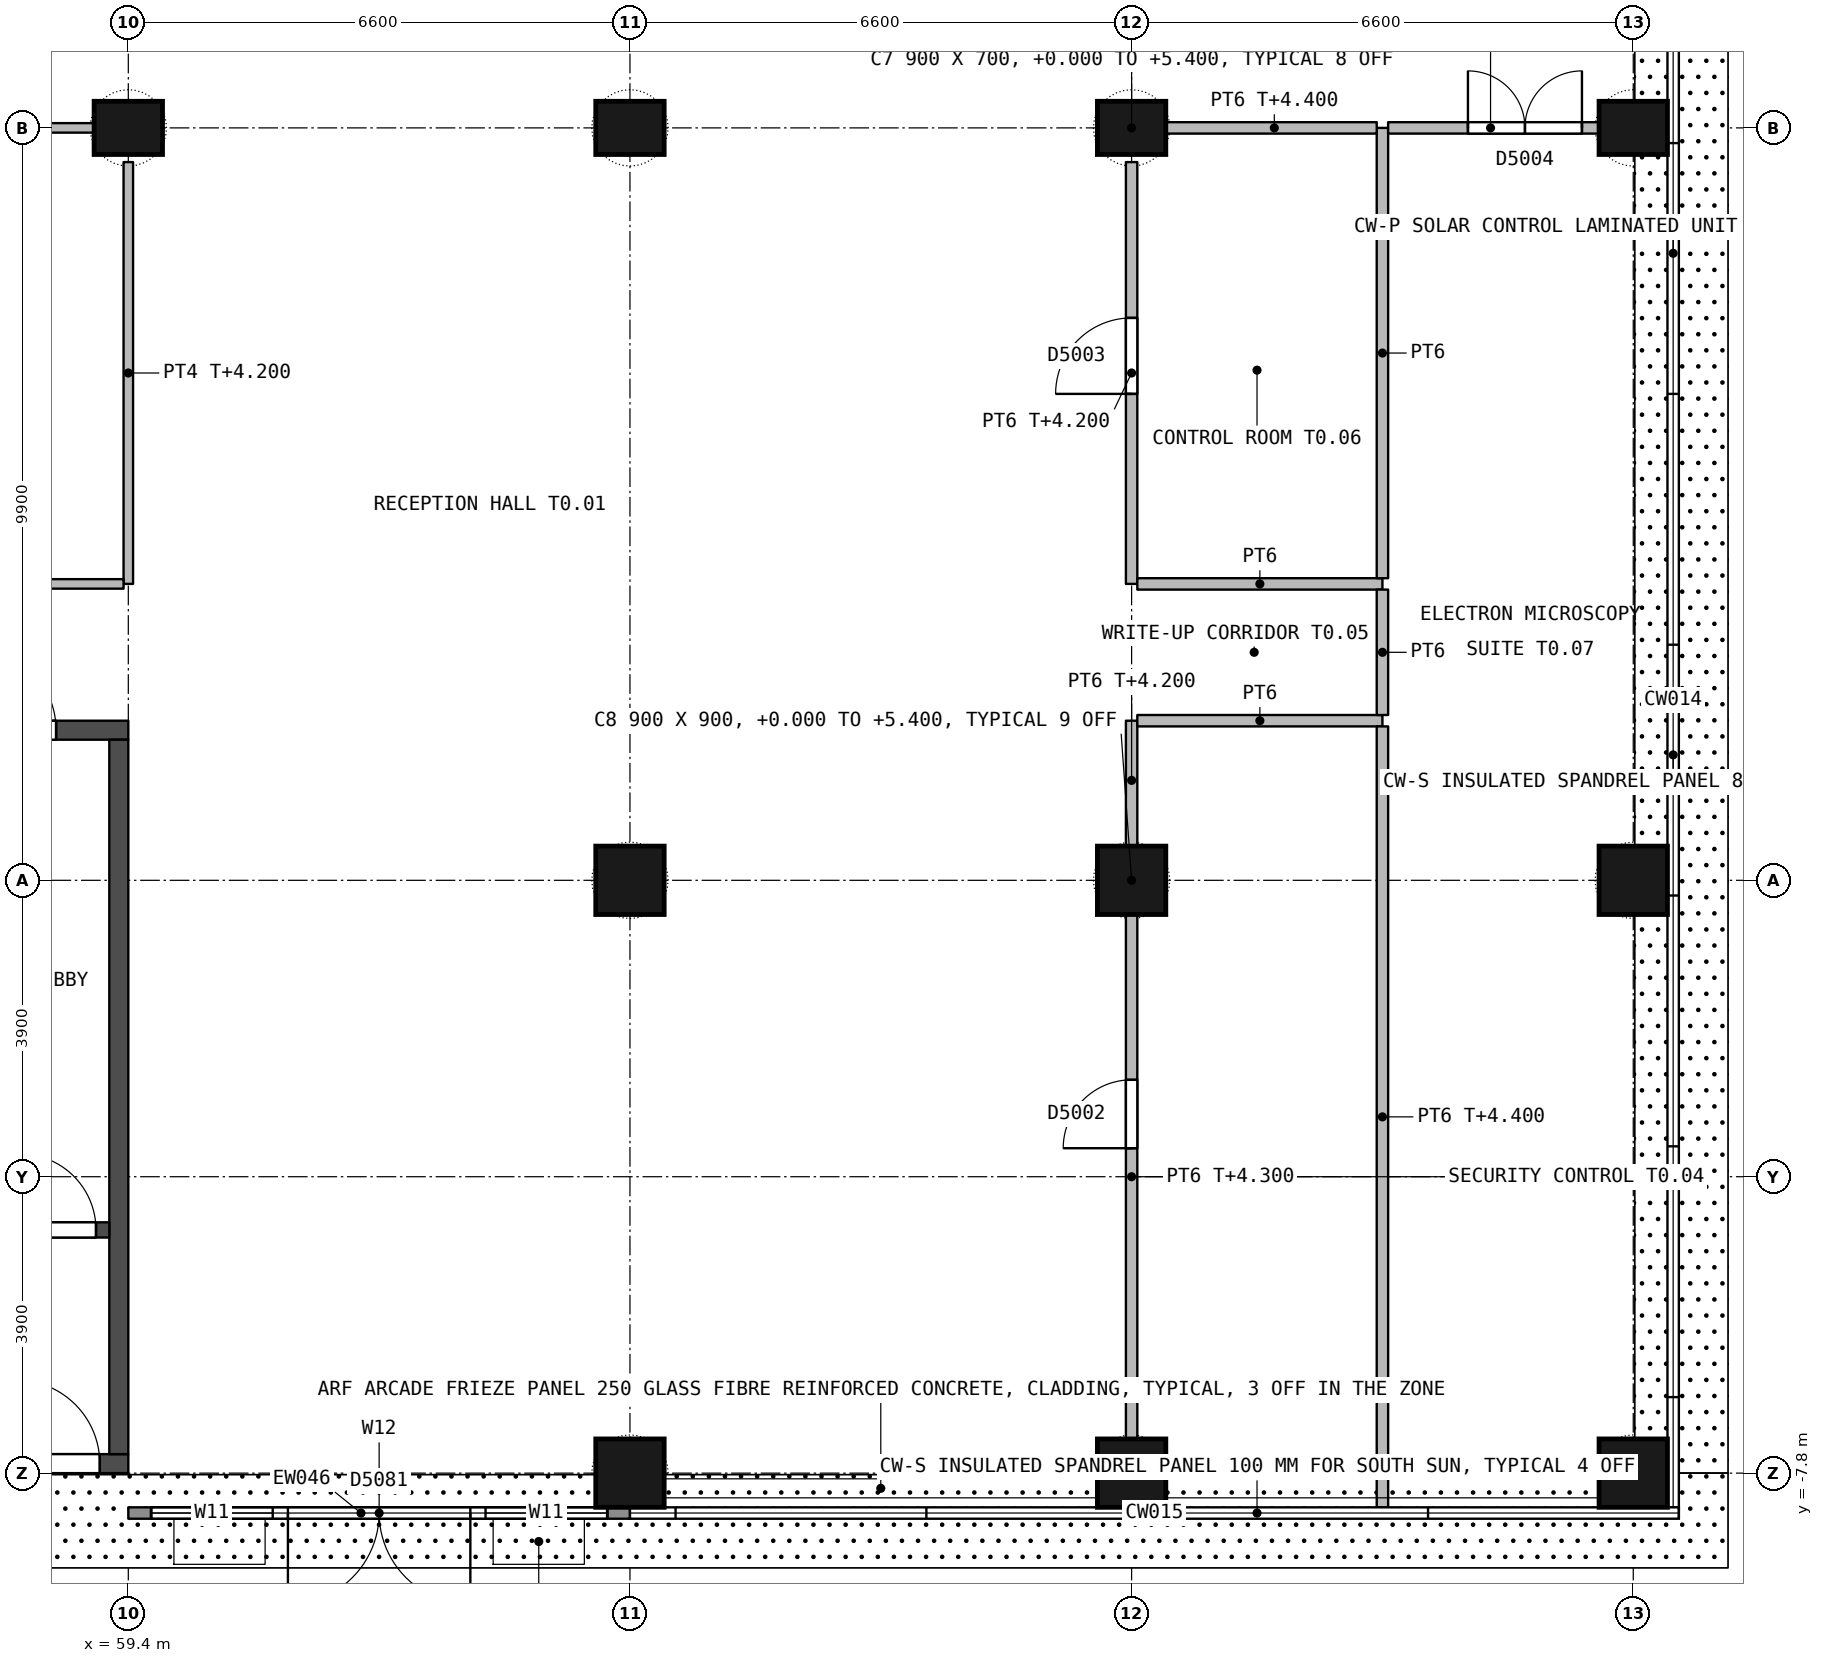
"""IFC4 building model, lengths in metres.
Left out: names, types, materials, properties, quantities, classifications, styles, units other than length and angle.
Written with IfcOpenShell. Run it as: python <this file> out.ifc"""

import sys

from ifc_helpers import new_model, si_unit, direction, frame, frame_2d, origin, origin_2d, place, context, subcontext, project, spatial, rectangle, extrude, element, fill, save


model = new_model("IFC4")
c1 = context("Model", 3, precision=1e-05, world=origin(), true_north=direction((0.0, 1.0)))
c2 = subcontext(c1, "Body", "Model", "MODEL_VIEW")
j1 = project(units=[si_unit("LENGTHUNIT", "METRE"), si_unit("PLANEANGLEUNIT", "RADIAN")], contexts=[c1])
p1 = place(None, origin())
s1 = spatial("IfcSite", under=j1, at=p1, CompositionType="ELEMENT")
p2 = place(p1, origin())
s2 = spatial("IfcBuilding", under=s1, at=p2, CompositionType="ELEMENT")
p3 = place(p2, origin())
s3 = spatial("IfcBuildingStorey", under=s2, at=p3, CompositionType="ELEMENT", Elevation=0.0)
p4 = place(p3, frame((59.4, 9.9, 0.0), z_axis=(0.0, 0.0, 1.0), x_axis=(1.0, 0.0, 0.0)))
e1 = element("IfcColumn", 1, at=p4, inside=s3, PredefinedType="COLUMN", context=c2, shape_type="SweptSolid", body=[
    extrude(rectangle(XDim=0.9, YDim=0.7, at=origin_2d()), origin(), (0.0, 0.0, 1.0), 5.4),
])
for number, where, z_axis, x_axis in (
    (2, (66.0, -7.8, 0.0), (0.0, 0.0, 1.0), (1.0, 0.0, 0.0)),
    (3, (66.0, 0.0, 0.0), (0.0, 0.0, 1.0), (1.0, 0.0, 0.0)),
):
    element("IfcColumn", number, at=place(p3, frame(where, z_axis=z_axis, x_axis=x_axis)), inside=s3, PredefinedType="COLUMN", context=c2, shape_type="SweptSolid", body=[
        extrude(rectangle(XDim=0.9, YDim=0.9, at=origin_2d()), origin(), (0.0, 0.0, 1.0), 5.4),
    ])
p5 = place(p3, frame((66.0, 9.9, 0.0), z_axis=(0.0, 0.0, 1.0), x_axis=(1.0, 0.0, 0.0)))
e4 = element("IfcColumn", 4, at=p5, inside=s3, PredefinedType="COLUMN", context=c2, shape_type="SweptSolid", body=[
    extrude(rectangle(XDim=0.9, YDim=0.7, at=origin_2d()), origin(), (0.0, 0.0, 1.0), 5.4),
])
for number, where, z_axis, x_axis in (
    (5, (72.6, -7.8, 0.0), (0.0, 0.0, 1.0), (1.0, 0.0, 0.0)),
    (6, (72.6, 0.0, 0.0), (0.0, 0.0, 1.0), (1.0, 0.0, 0.0)),
):
    element("IfcColumn", number, at=place(p3, frame(where, z_axis=z_axis, x_axis=x_axis)), inside=s3, PredefinedType="COLUMN", context=c2, shape_type="SweptSolid", body=[
        extrude(rectangle(XDim=0.9, YDim=0.9, at=origin_2d()), origin(), (0.0, 0.0, 1.0), 5.4),
    ])
p6 = place(p3, frame((72.6, 9.9, 0.0), z_axis=(0.0, 0.0, 1.0), x_axis=(1.0, 0.0, 0.0)))
e7 = element("IfcColumn", 7, at=p6, inside=s3, PredefinedType="COLUMN", context=c2, shape_type="SweptSolid", body=[
    extrude(rectangle(XDim=0.9, YDim=0.7, at=origin_2d()), origin(), (0.0, 0.0, 1.0), 5.4),
])
for number, where, z_axis, x_axis in (
    (8, (79.2, -7.8, 0.0), (0.0, 0.0, 1.0), (1.0, 0.0, 0.0)),
    (9, (79.2, 0.0, 0.0), (0.0, 0.0, 1.0), (1.0, 0.0, 0.0)),
):
    element("IfcColumn", number, at=place(p3, frame(where, z_axis=z_axis, x_axis=x_axis)), inside=s3, PredefinedType="COLUMN", context=c2, shape_type="SweptSolid", body=[
        extrude(rectangle(XDim=0.9, YDim=0.9, at=origin_2d()), origin(), (0.0, 0.0, 1.0), 5.4),
    ])
p7 = place(p3, frame((79.2, 9.9, 0.0), z_axis=(0.0, 0.0, 1.0), x_axis=(1.0, 0.0, 0.0)))
e10 = element("IfcColumn", 10, at=p7, inside=s3, PredefinedType="COLUMN", context=c2, shape_type="SweptSolid", body=[
    extrude(rectangle(XDim=0.9, YDim=0.7, at=origin_2d()), origin(), (0.0, 0.0, 1.0), 5.4),
])
p8 = place(p3, frame((59.4, 1.975, 0.0), z_axis=(0.0, 0.0, 1.0), x_axis=(-1.0, 0.0, 0.0)))
e11 = element("IfcWall", 11, at=p8, inside=s3, PredefinedType="SHEAR", context=c2, shape_type="SweptSolid", body=[
    extrude(rectangle(XDim=6.6, YDim=0.25, at=frame_2d((3.3, 0.0))), origin(), (0.0, 0.0, 1.0), 5.1),
])
p9 = place(p8, frame((0.95, 0.0, 0.0)))
e12 = element("IfcOpeningElement", 12, at=p9, cuts=e11, PredefinedType="OPENING", context=c2, shape_type="SweptSolid", body=[
    extrude(rectangle(XDim=1.1, YDim=2.1, at=frame_2d((0.55, 1.05))), frame((0.0, 0.135, 0.0), z_axis=(0.0, -1.0, 0.0), x_axis=(1.0, 0.0, 0.0)), (0.0, 0.0, 1.0), 0.27),
])
p10 = place(p3, frame((59.4, -7.675, 0.0), z_axis=(0.0, 0.0, 1.0), x_axis=(-1.0, 0.0, 0.0)))
e13 = element("IfcWall", 13, at=p10, inside=s3, PredefinedType="SHEAR", context=c2, shape_type="SweptSolid", body=[
    extrude(rectangle(XDim=6.6, YDim=0.25, at=frame_2d((3.3, 0.0))), origin(), (0.0, 0.0, 1.0), 5.1),
])
p11 = place(p10, frame((0.375, 0.0, 0.0)))
e14 = element("IfcOpeningElement", 14, at=p11, cuts=e13, PredefinedType="OPENING", context=c2, shape_type="SweptSolid", body=[
    extrude(rectangle(XDim=1.1, YDim=2.4, at=frame_2d((0.55, 1.2))), frame((0.0, 0.135, 0.0), z_axis=(0.0, -1.0, 0.0), x_axis=(1.0, 0.0, 0.0)), (0.0, 0.0, 1.0), 0.27),
])
p12 = place(p10, frame((4.735, 0.0, 2.05)))
e15 = element("IfcOpeningElement", 15, at=p12, cuts=e13, PredefinedType="OPENING", context=c2, shape_type="SweptSolid", body=[
    extrude(rectangle(XDim=0.9, YDim=1.2, at=frame_2d((0.45, 0.6))), frame((0.0, 0.135, 0.0), z_axis=(0.0, -1.0, 0.0), x_axis=(1.0, 0.0, 0.0)), (0.0, 0.0, 1.0), 0.27),
])
p13 = place(p3, frame((59.275, 1.85, 0.0), z_axis=(0.0, 0.0, 1.0), x_axis=(0.0, -1.0, 0.0)))
e16 = element("IfcWall", 16, at=p13, inside=s3, PredefinedType="SHEAR", context=c2, shape_type="SweptSolid", body=[
    extrude(rectangle(XDim=9.4, YDim=0.25, at=frame_2d((4.7, 0.0))), origin(), (0.0, 0.0, 1.0), 5.1),
])
p14 = place(p3, frame((59.15, -4.6, 0.0), z_axis=(0.0, 0.0, 1.0), x_axis=(-1.0, 0.0, 0.0)))
e17 = element("IfcWall", 17, at=p14, inside=s3, PredefinedType="SHEAR", context=c2, shape_type="SweptSolid", body=[
    extrude(rectangle(XDim=6.1, YDim=0.2, at=frame_2d((3.05, 0.0))), origin(), (0.0, 0.0, 1.0), 5.1),
])
p15 = place(p14, frame((0.175, 0.0, 0.0)))
e18 = element("IfcOpeningElement", 18, at=p15, cuts=e17, PredefinedType="OPENING", context=c2, shape_type="SweptSolid", body=[
    extrude(rectangle(XDim=1.0, YDim=2.1, at=frame_2d((0.5, 1.05))), frame((0.0, 0.11, 0.0), z_axis=(0.0, -1.0, 0.0), x_axis=(1.0, 0.0, 0.0)), (0.0, 0.0, 1.0), 0.22),
])
p16 = place(p3, frame((66.0, -8.325, 0.0), z_axis=(0.0, 0.0, 1.0), x_axis=(-1.0, 0.0, 0.0)))
e19 = element("IfcWall", 19, at=p16, inside=s3, PredefinedType="STANDARD", context=c2, shape_type="SweptSolid", body=[
    extrude(rectangle(XDim=6.6, YDim=0.15, at=frame_2d((3.3, 0.0))), origin(), (0.0, 0.0, 1.0), 5.1),
])
p17 = place(p16, frame((2.1, 0.0, 0.0)))
e20 = element("IfcOpeningElement", 20, at=p17, cuts=e19, PredefinedType="OPENING", context=c2, shape_type="SweptSolid", body=[
    extrude(rectangle(XDim=2.4, YDim=2.7, at=frame_2d((1.2, 1.35))), frame((0.0, 0.085, 0.0), z_axis=(0.0, -1.0, 0.0), x_axis=(1.0, 0.0, 0.0)), (0.0, 0.0, 1.0), 0.17),
])
p18 = place(p16, frame((4.7, 0.0, 0.1)))
e21 = element("IfcOpeningElement", 21, at=p18, cuts=e19, PredefinedType="OPENING", context=c2, shape_type="SweptSolid", body=[
    extrude(rectangle(XDim=1.6, YDim=2.6, at=frame_2d((0.8, 1.3))), frame((0.0, 0.085, 0.0), z_axis=(0.0, -1.0, 0.0), x_axis=(1.0, 0.0, 0.0)), (0.0, 0.0, 1.0), 0.17),
])
p19 = place(p16, frame((0.3, 0.0, 0.1)))
e22 = element("IfcOpeningElement", 22, at=p19, cuts=e19, PredefinedType="OPENING", context=c2, shape_type="SweptSolid", body=[
    extrude(rectangle(XDim=1.6, YDim=2.6, at=frame_2d((0.8, 1.3))), frame((0.0, 0.085, 0.0), z_axis=(0.0, -1.0, 0.0), x_axis=(1.0, 0.0, 0.0)), (0.0, 0.0, 1.0), 0.17),
])
p20 = place(p16, frame((0.3, 0.0, 2.85)))
e23 = element("IfcOpeningElement", 23, at=p20, cuts=e19, PredefinedType="OPENING", context=c2, shape_type="SweptSolid", body=[
    extrude(rectangle(XDim=6.0, YDim=2.1, at=frame_2d((3.0, 1.05))), frame((0.0, 0.085, 0.0), z_axis=(0.0, -1.0, 0.0), x_axis=(1.0, 0.0, 0.0)), (0.0, 0.0, 1.0), 0.17),
])
p21 = place(p3, frame((59.4, 9.45, 0.0), z_axis=(0.0, 0.0, 1.0), x_axis=(0.0, -1.0, 0.0)))
e24 = element("IfcWall", 24, at=p21, inside=s3, PredefinedType="PARTITIONING", context=c2, shape_type="SweptSolid", body=[
    extrude(rectangle(XDim=5.55, YDim=0.125, at=frame_2d((2.775, 0.0))), origin(), (0.0, 0.0, 1.0), 4.2),
])
p22 = place(p3, frame((72.6, -0.45, 0.0), z_axis=(0.0, 0.0, 1.0), x_axis=(0.0, -1.0, 0.0)))
e25 = element("IfcWall", 25, at=p22, inside=s3, PredefinedType="PARTITIONING", context=c2, shape_type="SweptSolid", body=[
    extrude(rectangle(XDim=6.9, YDim=0.15, at=frame_2d((3.45, 0.0))), origin(), (0.0, 0.0, 1.0), 4.3),
])
p23 = place(p22, frame((2.175, 0.0, 0.0)))
e26 = element("IfcOpeningElement", 26, at=p23, cuts=e25, PredefinedType="OPENING", context=c2, shape_type="SweptSolid", body=[
    extrude(rectangle(XDim=0.9, YDim=2.1, at=frame_2d((0.45, 1.05))), frame((0.0, 0.085, 0.0), z_axis=(0.0, -1.0, 0.0), x_axis=(1.0, 0.0, 0.0)), (0.0, 0.0, 1.0), 0.17),
])
p24 = place(p3, frame((72.6, 0.45, 0.0), z_axis=(0.0, 0.0, 1.0), x_axis=(0.0, 1.0, 0.0)))
e27 = element("IfcWall", 27, at=p24, inside=s3, PredefinedType="PARTITIONING", context=c2, shape_type="SweptSolid", body=[
    extrude(rectangle(XDim=1.65, YDim=0.15, at=frame_2d((0.825, 0.0))), origin(), (0.0, 0.0, 1.0), 4.2),
])
p25 = place(p3, frame((72.6, 9.45, 0.0), z_axis=(0.0, 0.0, 1.0), x_axis=(0.0, -1.0, 0.0)))
e28 = element("IfcWall", 28, at=p25, inside=s3, PredefinedType="PARTITIONING", context=c2, shape_type="SweptSolid", body=[
    extrude(rectangle(XDim=5.55, YDim=0.15, at=frame_2d((2.775, 0.0))), origin(), (0.0, 0.0, 1.0), 4.2),
])
p26 = place(p25, frame((2.05, 0.0, 0.0)))
e29 = element("IfcOpeningElement", 29, at=p26, cuts=e28, PredefinedType="OPENING", context=c2, shape_type="SweptSolid", body=[
    extrude(rectangle(XDim=1.0, YDim=2.1, at=frame_2d((0.5, 1.05))), frame((0.0, 0.085, 0.0), z_axis=(0.0, -1.0, 0.0), x_axis=(1.0, 0.0, 0.0)), (0.0, 0.0, 1.0), 0.17),
])
p27 = place(p3, frame((59.337, 3.9, 0.0), z_axis=(0.0, 0.0, 1.0), x_axis=(-1.0, 0.0, 0.0)))
e30 = element("IfcWall", 30, at=p27, inside=s3, PredefinedType="PARTITIONING", context=c2, shape_type="SweptSolid", body=[
    extrude(rectangle(XDim=6.412, YDim=0.125, at=frame_2d((3.206, 0.0))), origin(), (0.0, 0.0, 1.0), 5.1),
])
p28 = place(p3, frame((58.95, 9.9, 0.0), z_axis=(0.0, 0.0, 1.0), x_axis=(-1.0, 0.0, 0.0)))
e31 = element("IfcWall", 31, at=p28, inside=s3, PredefinedType="PARTITIONING", context=c2, shape_type="SweptSolid", body=[
    extrude(rectangle(XDim=5.7, YDim=0.125, at=frame_2d((2.85, 0.0))), origin(), (0.0, 0.0, 1.0), 4.4),
])
p29 = place(p28, frame((2.4, 0.0, 0.0)))
e32 = element("IfcOpeningElement", 32, at=p29, cuts=e31, PredefinedType="OPENING", context=c2, shape_type="SweptSolid", body=[
    extrude(rectangle(XDim=0.9, YDim=2.1, at=frame_2d((0.45, 1.05))), frame((0.0, 0.073, 0.0), z_axis=(0.0, -1.0, 0.0), x_axis=(1.0, 0.0, 0.0)), (0.0, 0.0, 1.0), 0.145),
])
p30 = place(p3, frame((75.9, 2.1, 0.0), z_axis=(0.0, 0.0, 1.0), x_axis=(-1.0, 0.0, 0.0)))
e33 = element("IfcWall", 33, at=p30, inside=s3, PredefinedType="PARTITIONING", context=c2, shape_type="SweptSolid", body=[
    extrude(rectangle(XDim=3.225, YDim=0.15, at=frame_2d((1.612, 0.0))), origin(), (0.0, 0.0, 1.0), 5.1),
])
p31 = place(p3, frame((75.9, -8.25, 0.0), z_axis=(0.0, 0.0, 1.0), x_axis=(0.0, 1.0, 0.0)))
e34 = element("IfcWall", 34, at=p31, inside=s3, PredefinedType="PARTITIONING", context=c2, shape_type="SweptSolid", body=[
    extrude(rectangle(XDim=10.275, YDim=0.15, at=frame_2d((5.137, 0.0))), origin(), (0.0, 0.0, 1.0), 4.4),
])
p32 = place(p3, frame((75.9, 3.9, 0.0), z_axis=(0.0, 0.0, 1.0), x_axis=(-1.0, 0.0, 0.0)))
e35 = element("IfcWall", 35, at=p32, inside=s3, PredefinedType="PARTITIONING", context=c2, shape_type="SweptSolid", body=[
    extrude(rectangle(XDim=3.225, YDim=0.15, at=frame_2d((1.612, 0.0))), origin(), (0.0, 0.0, 1.0), 5.1),
])
p33 = place(p3, frame((75.9, 2.175, 0.0), z_axis=(0.0, 0.0, 1.0), x_axis=(0.0, 1.0, 0.0)))
e36 = element("IfcWall", 36, at=p33, inside=s3, PredefinedType="PARTITIONING", context=c2, shape_type="SweptSolid", body=[
    extrude(rectangle(XDim=1.65, YDim=0.15, at=frame_2d((0.825, 0.0))), origin(), (0.0, 0.0, 1.0), 5.1),
])
p34 = place(p3, frame((75.9, 3.975, 0.0), z_axis=(0.0, 0.0, 1.0), x_axis=(0.0, 1.0, 0.0)))
e37 = element("IfcWall", 37, at=p34, inside=s3, PredefinedType="PARTITIONING", context=c2, shape_type="SweptSolid", body=[
    extrude(rectangle(XDim=5.925, YDim=0.15, at=frame_2d((2.962, 0.0))), origin(), (0.0, 0.0, 1.0), 5.1),
])
p35 = place(p3, frame((75.825, 9.9, 0.0), z_axis=(0.0, 0.0, 1.0), x_axis=(-1.0, 0.0, 0.0)))
e38 = element("IfcWall", 38, at=p35, inside=s3, PredefinedType="PARTITIONING", context=c2, shape_type="SweptSolid", body=[
    extrude(rectangle(XDim=2.775, YDim=0.15, at=frame_2d((1.387, 0.0))), origin(), (0.0, 0.0, 1.0), 4.4),
])
p36 = place(p3, frame((75.975, 9.9, 0.0), z_axis=(0.0, 0.0, 1.0), x_axis=(1.0, 0.0, 0.0)))
e39 = element("IfcWall", 39, at=p36, inside=s3, PredefinedType="PARTITIONING", context=c2, shape_type="SweptSolid", body=[
    extrude(rectangle(XDim=2.775, YDim=0.15, at=frame_2d((1.387, 0.0))), origin(), (0.0, 0.0, 1.0), 4.4),
])
p37 = place(p36, frame((1.05, 0.0, 0.0)))
e40 = element("IfcOpeningElement", 40, at=p37, cuts=e39, PredefinedType="OPENING", context=c2, shape_type="SweptSolid", body=[
    extrude(rectangle(XDim=1.5, YDim=2.4, at=frame_2d((0.75, 1.2))), frame((0.0, 0.085, 0.0), z_axis=(0.0, -1.0, 0.0), x_axis=(1.0, 0.0, 0.0)), (0.0, 0.0, 1.0), 0.17),
])
p38 = place(p9, origin())
e41 = element("IfcDoor", 41, at=p38, inside=s3, OperationType="SINGLE_SWING_RIGHT", PredefinedType="DOOR", context=c2, shape_type="SweptSolid", body=[
    extrude(rectangle(XDim=1.1, YDim=2.1, at=frame_2d((0.55, 1.05))), frame((0.0, 0.025, 0.0), z_axis=(0.0, -1.0, 0.0), x_axis=(1.0, 0.0, 0.0)), (0.0, 0.0, 1.0), 0.05),
])
fill(e12, e41)
p39 = place(p15, origin())
e42 = element("IfcDoor", 42, at=p39, inside=s3, OperationType="SINGLE_SWING_RIGHT", PredefinedType="DOOR", context=c2, shape_type="SweptSolid", body=[
    extrude(rectangle(XDim=1.0, YDim=2.1, at=frame_2d((0.5, 1.05))), frame((0.0, 0.025, 0.0), z_axis=(0.0, -1.0, 0.0), x_axis=(1.0, 0.0, 0.0)), (0.0, 0.0, 1.0), 0.05),
])
fill(e18, e42)
p40 = place(p11, origin())
e43 = element("IfcDoor", 43, at=p40, inside=s3, OperationType="SINGLE_SWING_RIGHT", PredefinedType="DOOR", context=c2, shape_type="SweptSolid", body=[
    extrude(rectangle(XDim=1.1, YDim=2.4, at=frame_2d((0.55, 1.2))), frame((0.0, 0.025, 0.0), z_axis=(0.0, -1.0, 0.0), x_axis=(1.0, 0.0, 0.0)), (0.0, 0.0, 1.0), 0.05),
])
fill(e14, e43)
p41 = place(p17, origin())
e44 = element("IfcDoor", 44, at=p41, inside=s3, OperationType="DOUBLE_DOOR_SINGLE_SWING", PredefinedType="DOOR", context=c2, shape_type="SweptSolid", body=[
    extrude(rectangle(XDim=2.4, YDim=2.7, at=frame_2d((1.2, 1.35))), frame((0.0, 0.025, 0.0), z_axis=(0.0, -1.0, 0.0), x_axis=(1.0, 0.0, 0.0)), (0.0, 0.0, 1.0), 0.05),
])
fill(e20, e44)
p42 = place(p18, origin())
e45 = element("IfcWindow", 45, at=p42, inside=s3, PartitioningType="SINGLE_PANEL", PredefinedType="WINDOW", context=c2, shape_type="SweptSolid", body=[
    extrude(rectangle(XDim=1.6, YDim=2.6, at=frame_2d((0.8, 1.3))), frame((0.0, 0.03, 0.0), z_axis=(0.0, -1.0, 0.0), x_axis=(1.0, 0.0, 0.0)), (0.0, 0.0, 1.0), 0.06),
])
fill(e21, e45)
p43 = place(p19, origin())
e46 = element("IfcWindow", 46, at=p43, inside=s3, PartitioningType="SINGLE_PANEL", PredefinedType="WINDOW", context=c2, shape_type="SweptSolid", body=[
    extrude(rectangle(XDim=1.6, YDim=2.6, at=frame_2d((0.8, 1.3))), frame((0.0, 0.03, 0.0), z_axis=(0.0, -1.0, 0.0), x_axis=(1.0, 0.0, 0.0)), (0.0, 0.0, 1.0), 0.06),
])
fill(e22, e46)
p44 = place(p20, origin())
e47 = element("IfcWindow", 47, at=p44, inside=s3, PartitioningType="SINGLE_PANEL", PredefinedType="WINDOW", context=c2, shape_type="SweptSolid", body=[
    extrude(rectangle(XDim=6.0, YDim=2.1, at=frame_2d((3.0, 1.05))), frame((0.0, 0.03, 0.0), z_axis=(0.0, -1.0, 0.0), x_axis=(1.0, 0.0, 0.0)), (0.0, 0.0, 1.0), 0.06),
])
fill(e23, e47)
p45 = place(p23, origin())
e48 = element("IfcDoor", 48, at=p45, inside=s3, OperationType="SINGLE_SWING_RIGHT", PredefinedType="DOOR", context=c2, shape_type="SweptSolid", body=[
    extrude(rectangle(XDim=0.9, YDim=2.1, at=frame_2d((0.45, 1.05))), frame((0.0, 0.027, 0.0), z_axis=(0.0, -1.0, 0.0), x_axis=(1.0, 0.0, 0.0)), (0.0, 0.0, 1.0), 0.054),
])
fill(e26, e48)
p46 = place(p26, origin())
e49 = element("IfcDoor", 49, at=p46, inside=s3, OperationType="SINGLE_SWING_RIGHT", PredefinedType="DOOR", context=c2, shape_type="SweptSolid", body=[
    extrude(rectangle(XDim=1.0, YDim=2.1, at=frame_2d((0.5, 1.05))), frame((0.0, 0.027, 0.0), z_axis=(0.0, -1.0, 0.0), x_axis=(1.0, 0.0, 0.0)), (0.0, 0.0, 1.0), 0.054),
])
fill(e29, e49)
p47 = place(p37, origin())
e50 = element("IfcDoor", 50, at=p47, inside=s3, OperationType="DOUBLE_DOOR_SINGLE_SWING", PredefinedType="DOOR", context=c2, shape_type="SweptSolid", body=[
    extrude(rectangle(XDim=1.5, YDim=2.4, at=frame_2d((0.75, 1.2))), frame((0.0, 0.027, 0.0), z_axis=(0.0, -1.0, 0.0), x_axis=(1.0, 0.0, 0.0)), (0.0, 0.0, 1.0), 0.054),
])
fill(e40, e50)
save(model, sys.argv[1])
